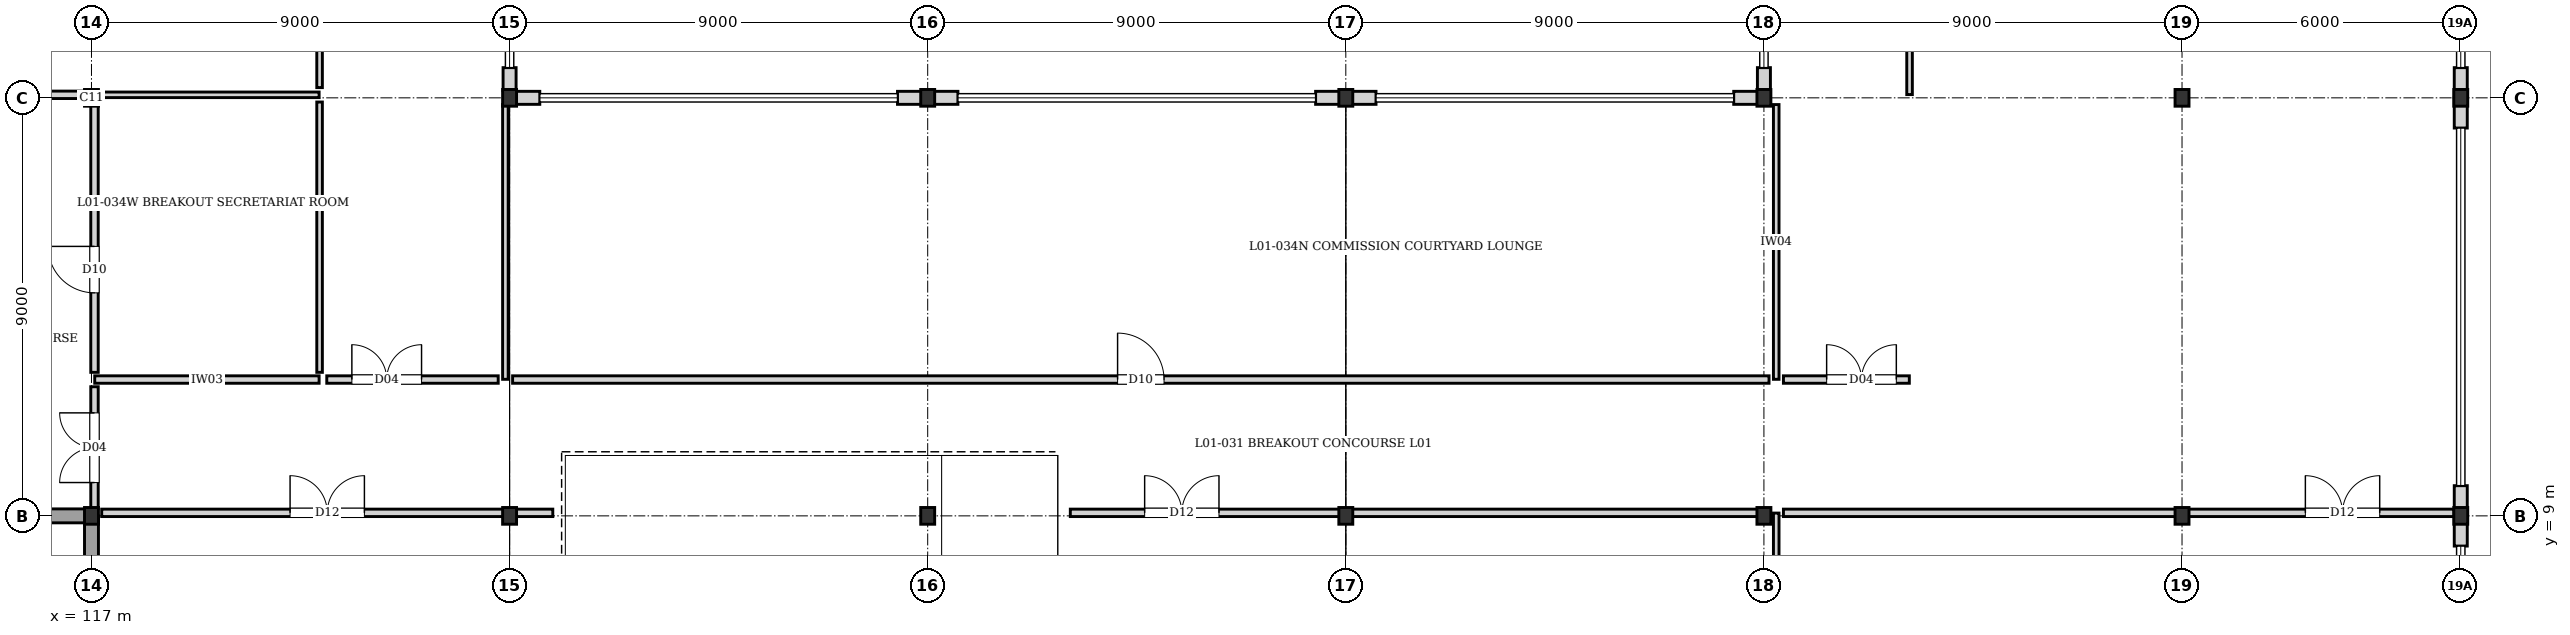
"""IFC4 building model, lengths in metres.
Left out: names, types, materials, properties, quantities, classifications, styles, units other than length and angle.
Written with IfcOpenShell. Run it as: python <this file> out.ifc"""

import sys

from ifc_helpers import new_model, si_unit, direction, frame, frame_2d, origin, origin_2d, place, context, subcontext, project, spatial, rectangle, i_section, extrude, element, fill, save


model = new_model("IFC4")
c1 = context("Model", 3, precision=1e-05, world=origin(), true_north=direction((0.0, 1.0)))
c2 = subcontext(c1, "Body", "Model", "MODEL_VIEW")
j1 = project(units=[si_unit("LENGTHUNIT", "METRE"), si_unit("PLANEANGLEUNIT", "RADIAN")], contexts=[c1])
p1 = place(None, origin())
s1 = spatial("IfcSite", under=j1, at=p1, CompositionType="ELEMENT")
p2 = place(p1, origin())
s2 = spatial("IfcBuilding", under=s1, at=p2, CompositionType="ELEMENT")
p3 = place(p2, frame((0.0, 0.0, 4.32)))
s3 = spatial("IfcBuildingStorey", under=s2, at=p3, CompositionType="ELEMENT", Elevation=4.32)
for number, where, z_axis, x_axis in (
    (1, (117.0, 9.0, 0.0), (0.0, 0.0, 1.0), (1.0, 0.0, 0.0)),
    (2, (117.0, 18.0, 0.0), (0.0, 0.0, 1.0), (1.0, 0.0, 0.0)),
    (3, (126.0, 9.0, 0.0), (0.0, 0.0, 1.0), (1.0, 0.0, 0.0)),
    (4, (126.0, 18.0, 0.0), (0.0, 0.0, 1.0), (1.0, 0.0, 0.0)),
    (5, (135.0, 9.0, 0.0), (0.0, 0.0, 1.0), (1.0, 0.0, 0.0)),
    (6, (135.0, 18.0, 0.0), (0.0, 0.0, 1.0), (1.0, 0.0, 0.0)),
    (7, (144.0, 9.0, 0.0), (0.0, 0.0, 1.0), (1.0, 0.0, 0.0)),
    (8, (144.0, 18.0, 0.0), (0.0, 0.0, 1.0), (1.0, 0.0, 0.0)),
    (9, (153.0, 9.0, 0.0), (0.0, 0.0, 1.0), (1.0, 0.0, 0.0)),
    (10, (153.0, 18.0, 0.0), (0.0, 0.0, 1.0), (1.0, 0.0, 0.0)),
    (11, (162.0, 9.0, 0.0), (0.0, 0.0, 1.0), (1.0, 0.0, 0.0)),
    (12, (162.0, 18.0, 0.0), (0.0, 0.0, 1.0), (1.0, 0.0, 0.0)),
    (13, (168.0, 9.0, 0.0), (0.0, 0.0, 1.0), (1.0, 0.0, 0.0)),
    (14, (168.0, 18.0, 0.0), (0.0, 0.0, 1.0), (1.0, 0.0, 0.0)),
):
    element("IfcColumn", number, at=place(p3, frame(where, z_axis=z_axis, x_axis=x_axis)), inside=s3, PredefinedType="COLUMN", context=c2, shape_type="SweptSolid", body=[
        extrude(i_section(OverallWidth=0.3, OverallDepth=0.36, WebThickness=0.012, FlangeThickness=0.022, at=origin_2d()), origin(), (0.0, 0.0, 1.0), 3.84),
    ])
p4 = place(p3, frame((168.0, 18.65, 0.0), z_axis=(0.0, 0.0, 1.0), x_axis=(0.0, -1.0, 0.0)))
e15 = element("IfcWall", 15, at=p4, inside=s3, PredefinedType="SOLIDWALL", context=c2, shape_type="SweptSolid", body=[
    extrude(rectangle(XDim=0.65, YDim=0.28, at=frame_2d((0.325, 0.0))), origin(), (0.0, 0.0, 1.0), 3.22),
])
for number, where, z_axis, x_axis in (
    (16, (168.0, 18.0, 0.0), (0.0, 0.0, 1.0), (0.0, -1.0, 0.0)),
    (17, (168.0, 9.65, 0.0), (0.0, 0.0, 1.0), (0.0, -1.0, 0.0)),
):
    element("IfcWall", number, at=place(p3, frame(where, z_axis=z_axis, x_axis=x_axis)), inside=s3, PredefinedType="SOLIDWALL", context=c2, shape_type="SweptSolid", body=[
        extrude(rectangle(XDim=0.65, YDim=0.28, at=frame_2d((0.325, 0.0))), origin(), (0.0, 0.0, 1.0), 3.28),
    ])
p5 = place(p3, frame((168.0, 9.0, 0.0), z_axis=(0.0, 0.0, 1.0), x_axis=(0.0, -1.0, 0.0)))
e18 = element("IfcWall", 18, at=p5, inside=s3, PredefinedType="SOLIDWALL", context=c2, shape_type="SweptSolid", body=[
    extrude(rectangle(XDim=0.65, YDim=0.28, at=frame_2d((0.325, 0.0))), origin(), (0.0, 0.0, 1.0), 3.6),
])
for number, where, z_axis, x_axis in (
    (19, (153.0, 18.155, 0.0), (0.0, 0.0, 1.0), (0.0, 1.0, 0.0)),
    (20, (126.0, 18.65, 0.0), (0.0, 0.0, 1.0), (0.0, -1.0, 0.0)),
):
    element("IfcWall", number, at=place(p3, frame(where, z_axis=z_axis, x_axis=x_axis)), inside=s3, PredefinedType="SOLIDWALL", context=c2, shape_type="SweptSolid", body=[
        extrude(rectangle(XDim=0.495, YDim=0.28, at=frame_2d((0.248, 0.0))), origin(), (0.0, 0.0, 1.0), 3.6),
    ])
for number, where, z_axis, x_axis in (
    (21, (126.0, 18.0, 0.0), (0.0, 0.0, 1.0), (1.0, 0.0, 0.0)),
    (22, (134.35, 18.0, 0.0), (0.0, 0.0, 1.0), (1.0, 0.0, 0.0)),
):
    element("IfcWall", number, at=place(p3, frame(where, z_axis=z_axis, x_axis=x_axis)), inside=s3, PredefinedType="SOLIDWALL", context=c2, shape_type="SweptSolid", body=[
        extrude(rectangle(XDim=0.65, YDim=0.28, at=frame_2d((0.325, 0.0))), origin(), (0.0, 0.0, 1.0), 3.28),
    ])
for number, where, z_axis, x_axis in (
    (23, (135.0, 18.0, 0.0), (0.0, 0.0, 1.0), (1.0, 0.0, 0.0)),
    (24, (143.35, 18.0, 0.0), (0.0, 0.0, 1.0), (1.0, 0.0, 0.0)),
):
    element("IfcWall", number, at=place(p3, frame(where, z_axis=z_axis, x_axis=x_axis)), inside=s3, PredefinedType="SOLIDWALL", context=c2, shape_type="SweptSolid", body=[
        extrude(rectangle(XDim=0.65, YDim=0.28, at=frame_2d((0.325, 0.0))), origin(), (0.0, 0.0, 1.0), 3.22),
    ])
for number, where, z_axis, x_axis in (
    (25, (144.0, 18.0, 0.0), (0.0, 0.0, 1.0), (1.0, 0.0, 0.0)),
    (26, (152.35, 18.0, 0.0), (0.0, 0.0, 1.0), (1.0, 0.0, 0.0)),
):
    element("IfcWall", number, at=place(p3, frame(where, z_axis=z_axis, x_axis=x_axis)), inside=s3, PredefinedType="SOLIDWALL", context=c2, shape_type="SweptSolid", body=[
        extrude(rectangle(XDim=0.65, YDim=0.28, at=frame_2d((0.325, 0.0))), origin(), (0.0, 0.0, 1.0), 3.18),
    ])
p6 = place(p3, frame((117.0, 0.0, 0.0), z_axis=(0.0, 0.0, 1.0), x_axis=(0.0, 1.0, 0.0)))
e27 = element("IfcWall", 27, at=p6, inside=s3, PredefinedType="SHEAR", context=c2, shape_type="SweptSolid", body=[
    extrude(rectangle(XDim=9.0, YDim=0.3, at=frame_2d((4.5, 0.0))), origin(), (0.0, 0.0, 1.0), 3.6),
])
p7 = place(p3, frame((108.0, 9.0, 0.0), z_axis=(0.0, 0.0, 1.0), x_axis=(1.0, 0.0, 0.0)))
e28 = element("IfcWall", 28, at=p7, inside=s3, PredefinedType="SHEAR", context=c2, shape_type="SweptSolid", body=[
    extrude(rectangle(XDim=9.0, YDim=0.3, at=frame_2d((4.5, 0.0))), origin(), (0.0, 0.0, 1.0), 3.6),
])
p8 = place(p7, frame((6.05, 0.0, 0.0)))
e29 = element("IfcOpeningElement", 29, at=p8, cuts=e28, PredefinedType="OPENING", context=c2, shape_type="SweptSolid", body=[
    extrude(rectangle(XDim=1.4, YDim=2.02, at=frame_2d((0.7, 1.01))), frame((0.0, 0.16, 0.0), z_axis=(0.0, -1.0, 0.0), x_axis=(1.0, 0.0, 0.0)), (0.0, 0.0, 1.0), 0.32),
])
p9 = place(p3, frame((108.145, 18.065, 0.0), z_axis=(0.0, 0.0, 1.0), x_axis=(1.0, 0.0, 0.0)))
e30 = element("IfcWall", 30, at=p9, inside=s3, PredefinedType="PARTITIONING", context=c2, shape_type="SweptSolid", body=[
    extrude(rectangle(XDim=8.915, YDim=0.16, at=frame_2d((4.458, 0.0))), origin(), (0.0, 0.0, 1.0), 3.18),
])
p10 = place(p3, frame((117.07, 11.935, 0.0), z_axis=(0.0, 0.0, 1.0), x_axis=(1.0, 0.0, 0.0)))
e31 = element("IfcWall", 31, at=p10, inside=s3, PredefinedType="PARTITIONING", context=c2, shape_type="SweptSolid", body=[
    extrude(rectangle(XDim=4.83, YDim=0.16, at=frame_2d((2.415, 0.0))), origin(), (0.0, 0.0, 1.0), 3.6),
])
p11 = place(p3, frame((153.265, 11.94, 0.0), z_axis=(0.0, 0.0, 1.0), x_axis=(0.0, 1.0, 0.0)))
e32 = element("IfcWall", 32, at=p11, inside=s3, PredefinedType="PARTITIONING", context=c2, shape_type="SweptSolid", body=[
    extrude(rectangle(XDim=5.915, YDim=0.12, at=frame_2d((2.958, 0.0))), origin(), (0.0, 0.0, 1.0), 3.6),
])
p12 = place(p3, frame((153.265, 0.145, 0.0), z_axis=(0.0, 0.0, 1.0), x_axis=(0.0, 1.0, 0.0)))
e33 = element("IfcWall", 33, at=p12, inside=s3, PredefinedType="PARTITIONING", context=c2, shape_type="SweptSolid", body=[
    extrude(rectangle(XDim=8.915, YDim=0.12, at=frame_2d((4.458, 0.0))), origin(), (0.0, 0.0, 1.0), 3.6),
])
p13 = place(p3, frame((117.07, 18.065, 0.0), z_axis=(0.0, 0.0, 1.0), x_axis=(1.0, 0.0, 0.0)))
e34 = element("IfcWall", 34, at=p13, inside=s3, PredefinedType="PARTITIONING", context=c2, shape_type="SweptSolid", body=[
    extrude(rectangle(XDim=4.83, YDim=0.12, at=frame_2d((2.415, 0.0))), origin(), (0.0, 0.0, 1.0), 3.35),
])
p14 = place(p3, frame((121.91, 12.09, 0.0), z_axis=(0.0, 0.0, 1.0), x_axis=(0.0, 1.0, 0.0)))
e35 = element("IfcWall", 35, at=p14, inside=s3, PredefinedType="PARTITIONING", context=c2, shape_type="SweptSolid", body=[
    extrude(rectangle(XDim=5.82, YDim=0.12, at=frame_2d((2.91, 0.0))), origin(), (0.0, 0.0, 1.0), 3.6),
])
p15 = place(p3, frame((125.91, 11.94, 0.0), z_axis=(0.0, 0.0, 1.0), x_axis=(0.0, 1.0, 0.0)))
e36 = element("IfcWall", 36, at=p15, inside=s3, PredefinedType="PARTITIONING", context=c2, shape_type="SweptSolid", body=[
    extrude(rectangle(XDim=5.915, YDim=0.12, at=frame_2d((2.958, 0.0))), origin(), (0.0, 0.0, 1.0), 3.09),
])
p16 = place(p3, frame((117.065, 9.155, 0.0), z_axis=(0.0, 0.0, 1.0), x_axis=(0.0, 1.0, 0.0)))
e37 = element("IfcWall", 37, at=p16, inside=s3, PredefinedType="PARTITIONING", context=c2, shape_type="SweptSolid", body=[
    extrude(rectangle(XDim=2.625, YDim=0.16, at=frame_2d((1.312, 0.0))), origin(), (0.0, 0.0, 1.0), 3.14),
])
p17 = place(p16, frame((0.562, 0.0, 0.0)))
e38 = element("IfcOpeningElement", 38, at=p17, cuts=e37, PredefinedType="OPENING", context=c2, shape_type="SweptSolid", body=[
    extrude(rectangle(XDim=1.5, YDim=2.1, at=frame_2d((0.75, 1.05))), frame((0.0, 0.09, 0.0), z_axis=(0.0, -1.0, 0.0), x_axis=(1.0, 0.0, 0.0)), (0.0, 0.0, 1.0), 0.18),
])
p18 = place(p3, frame((117.065, 12.09, 0.0), z_axis=(0.0, 0.0, 1.0), x_axis=(0.0, 1.0, 0.0)))
e39 = element("IfcWall", 39, at=p18, inside=s3, PredefinedType="PARTITIONING", context=c2, shape_type="SweptSolid", body=[
    extrude(rectangle(XDim=5.82, YDim=0.16, at=frame_2d((2.91, 0.0))), origin(), (0.0, 0.0, 1.0), 3.14),
])
p19 = place(p18, frame((1.712, 0.0, 0.0)))
e40 = element("IfcOpeningElement", 40, at=p19, cuts=e39, PredefinedType="OPENING", context=c2, shape_type="SweptSolid", body=[
    extrude(rectangle(XDim=1.0, YDim=2.1, at=frame_2d((0.5, 1.05))), frame((0.0, 0.09, 0.0), z_axis=(0.0, -1.0, 0.0), x_axis=(1.0, 0.0, 0.0)), (0.0, 0.0, 1.0), 0.18),
])
p20 = place(p3, frame((153.42, 11.935, 0.0), z_axis=(0.0, 0.0, 1.0), x_axis=(1.0, 0.0, 0.0)))
e41 = element("IfcWall", 41, at=p20, inside=s3, PredefinedType="PARTITIONING", context=c2, shape_type="SweptSolid", body=[
    extrude(rectangle(XDim=2.71, YDim=0.16, at=frame_2d((1.355, 0.0))), origin(), (0.0, 0.0, 1.0), 3.6),
])
p21 = place(p20, frame((0.93, 0.0, 0.0)))
e42 = element("IfcOpeningElement", 42, at=p21, cuts=e41, PredefinedType="OPENING", context=c2, shape_type="SweptSolid", body=[
    extrude(rectangle(XDim=1.5, YDim=2.1, at=frame_2d((0.75, 1.05))), frame((0.0, 0.09, 0.0), z_axis=(0.0, -1.0, 0.0), x_axis=(1.0, 0.0, 0.0)), (0.0, 0.0, 1.0), 0.18),
])
p22 = place(p3, frame((117.22, 9.065, 0.0), z_axis=(0.0, 0.0, 1.0), x_axis=(1.0, 0.0, 0.0)))
e43 = element("IfcWall", 43, at=p22, inside=s3, PredefinedType="PARTITIONING", context=c2, shape_type="SweptSolid", body=[
    extrude(rectangle(XDim=8.76, YDim=0.16, at=frame_2d((4.38, 0.0))), origin(), (0.0, 0.0, 1.0), 2.98),
])
p23 = place(p22, frame((4.055, 0.0, 0.0)))
e44 = element("IfcOpeningElement", 44, at=p23, cuts=e43, PredefinedType="OPENING", context=c2, shape_type="SweptSolid", body=[
    extrude(rectangle(XDim=1.6, YDim=2.3, at=frame_2d((0.8, 1.15))), frame((0.0, 0.09, 0.0), z_axis=(0.0, -1.0, 0.0), x_axis=(1.0, 0.0, 0.0)), (0.0, 0.0, 1.0), 0.18),
])
p24 = place(p3, frame((138.07, 9.065, 0.0), z_axis=(0.0, 0.0, 1.0), x_axis=(1.0, 0.0, 0.0)))
e45 = element("IfcWall", 45, at=p24, inside=s3, PredefinedType="PARTITIONING", context=c2, shape_type="SweptSolid", body=[
    extrude(rectangle(XDim=5.95, YDim=0.16, at=frame_2d((2.975, 0.0))), origin(), (0.0, 0.0, 1.0), 3.6),
])
p25 = place(p24, frame((1.6, 0.0, 0.0)))
e46 = element("IfcOpeningElement", 46, at=p25, cuts=e45, PredefinedType="OPENING", context=c2, shape_type="SweptSolid", body=[
    extrude(rectangle(XDim=1.6, YDim=2.3, at=frame_2d((0.8, 1.15))), frame((0.0, 0.09, 0.0), z_axis=(0.0, -1.0, 0.0), x_axis=(1.0, 0.0, 0.0)), (0.0, 0.0, 1.0), 0.18),
])
p26 = place(p3, frame((153.42, 9.065, 0.0), z_axis=(0.0, 0.0, 1.0), x_axis=(1.0, 0.0, 0.0)))
e47 = element("IfcWall", 47, at=p26, inside=s3, PredefinedType="PARTITIONING", context=c2, shape_type="SweptSolid", body=[
    extrude(rectangle(XDim=8.56, YDim=0.16, at=frame_2d((4.28, 0.0))), origin(), (0.0, 0.0, 1.0), 3.19),
])
p27 = place(p3, frame((126.065, 11.935, 0.0), z_axis=(0.0, 0.0, 1.0), x_axis=(1.0, 0.0, 0.0)))
e48 = element("IfcWall", 48, at=p27, inside=s3, PredefinedType="PARTITIONING", context=c2, shape_type="SweptSolid", body=[
    extrude(rectangle(XDim=27.045, YDim=0.16, at=frame_2d((13.522, 0.0))), origin(), (0.0, 0.0, 1.0), 3.6),
])
p28 = place(p27, frame((13.022, 0.0, 0.0)))
e49 = element("IfcOpeningElement", 49, at=p28, cuts=e48, PredefinedType="OPENING", context=c2, shape_type="SweptSolid", body=[
    extrude(rectangle(XDim=1.0, YDim=2.1, at=frame_2d((0.5, 1.05))), frame((0.0, 0.09, 0.0), z_axis=(0.0, -1.0, 0.0), x_axis=(1.0, 0.0, 0.0)), (0.0, 0.0, 1.0), 0.18),
])
p29 = place(p3, frame((122.065, 11.935, 0.0), z_axis=(0.0, 0.0, 1.0), x_axis=(1.0, 0.0, 0.0)))
e50 = element("IfcWall", 50, at=p29, inside=s3, PredefinedType="PARTITIONING", context=c2, shape_type="SweptSolid", body=[
    extrude(rectangle(XDim=3.69, YDim=0.16, at=frame_2d((1.845, 0.0))), origin(), (0.0, 0.0, 1.0), 3.6),
])
p30 = place(p29, frame((0.54, 0.0, 0.0)))
e51 = element("IfcOpeningElement", 51, at=p30, cuts=e50, PredefinedType="OPENING", context=c2, shape_type="SweptSolid", body=[
    extrude(rectangle(XDim=1.5, YDim=2.1, at=frame_2d((0.75, 1.05))), frame((0.0, 0.09, 0.0), z_axis=(0.0, -1.0, 0.0), x_axis=(1.0, 0.0, 0.0)), (0.0, 0.0, 1.0), 0.18),
])
p31 = place(p3, frame((156.135, 18.07, 0.0), z_axis=(0.0, 0.0, 1.0), x_axis=(0.0, 1.0, 0.0)))
e52 = element("IfcWall", 52, at=p31, inside=s3, PredefinedType="PARTITIONING", context=c2, shape_type="SweptSolid", body=[
    extrude(rectangle(XDim=17.685, YDim=0.12, at=frame_2d((8.842, 0.0))), origin(), (0.0, 0.0, 1.0), 3.6),
])
p32 = place(p31, frame((14.485, 0.0, 0.0)))
e53 = element("IfcOpeningElement", 53, at=p32, cuts=e52, PredefinedType="OPENING", context=c2, shape_type="SweptSolid", body=[
    extrude(rectangle(XDim=1.6, YDim=2.3, at=frame_2d((0.8, 1.15))), frame((0.0, 0.07, 0.0), z_axis=(0.0, -1.0, 0.0), x_axis=(1.0, 0.0, 0.0)), (0.0, 0.0, 1.0), 0.14),
])
p33 = place(p3, frame((121.91, 18.22, 0.0), z_axis=(0.0, 0.0, 1.0), x_axis=(0.0, 1.0, 0.0)))
e54 = element("IfcWall", 54, at=p33, inside=s3, PredefinedType="PARTITIONING", context=c2, shape_type="SweptSolid", body=[
    extrude(rectangle(XDim=8.535, YDim=0.12, at=frame_2d((4.268, 0.0))), origin(), (0.0, 0.0, 1.0), 3.6),
])
p34 = place(p33, frame((3.468, 0.0, 0.0)))
e55 = element("IfcOpeningElement", 55, at=p34, cuts=e54, PredefinedType="OPENING", context=c2, shape_type="SweptSolid", body=[
    extrude(rectangle(XDim=1.6, YDim=2.3, at=frame_2d((0.8, 1.15))), frame((0.0, 0.07, 0.0), z_axis=(0.0, -1.0, 0.0), x_axis=(1.0, 0.0, 0.0)), (0.0, 0.0, 1.0), 0.14),
])
p35 = place(p3, frame((125.98, 9.065, 0.0), z_axis=(0.0, 0.0, 1.0), x_axis=(1.0, 0.0, 0.0)))
e56 = element("IfcWall", 56, at=p35, inside=s3, PredefinedType="PARTITIONING", context=c2, shape_type="SweptSolid", body=[
    extrude(rectangle(XDim=0.95, YDim=0.16, at=frame_2d((0.475, 0.0))), origin(), (0.0, 0.0, 1.0), 3.6),
])
p36 = place(p3, frame((144.02, 9.065, 0.0), z_axis=(0.0, 0.0, 1.0), x_axis=(1.0, 0.0, 0.0)))
e57 = element("IfcWall", 57, at=p36, inside=s3, PredefinedType="PARTITIONING", context=c2, shape_type="SweptSolid", body=[
    extrude(rectangle(XDim=9.09, YDim=0.16, at=frame_2d((4.545, 0.0))), origin(), (0.0, 0.0, 1.0), 3.25),
])
p37 = place(p3, frame((161.98, 9.065, 0.0), z_axis=(0.0, 0.0, 1.0), x_axis=(1.0, 0.0, 0.0)))
e58 = element("IfcWall", 58, at=p37, inside=s3, PredefinedType="PARTITIONING", context=c2, shape_type="SweptSolid", body=[
    extrude(rectangle(XDim=5.875, YDim=0.16, at=frame_2d((2.938, 0.0))), origin(), (0.0, 0.0, 1.0), 3.14),
])
p38 = place(p37, frame((2.675, 0.0, 0.0)))
e59 = element("IfcOpeningElement", 59, at=p38, cuts=e58, PredefinedType="OPENING", context=c2, shape_type="SweptSolid", body=[
    extrude(rectangle(XDim=1.6, YDim=2.3, at=frame_2d((0.8, 1.15))), frame((0.0, 0.09, 0.0), z_axis=(0.0, -1.0, 0.0), x_axis=(1.0, 0.0, 0.0)), (0.0, 0.0, 1.0), 0.18),
])
p39 = place(p17, origin())
e60 = element("IfcDoor", 60, at=p39, inside=s3, OperationType="DOUBLE_DOOR_SINGLE_SWING", PredefinedType="DOOR", context=c2, shape_type="SweptSolid", body=[
    extrude(rectangle(XDim=1.5, YDim=2.1, at=frame_2d((0.75, 1.05))), frame((0.0, 0.025, 0.0), z_axis=(0.0, -1.0, 0.0), x_axis=(1.0, 0.0, 0.0)), (0.0, 0.0, 1.0), 0.05),
])
fill(e38, e60)
p40 = place(p19, origin())
e61 = element("IfcDoor", 61, at=p40, inside=s3, OperationType="SINGLE_SWING_RIGHT", PredefinedType="DOOR", context=c2, shape_type="SweptSolid", body=[
    extrude(rectangle(XDim=1.0, YDim=2.1, at=frame_2d((0.5, 1.05))), frame((0.0, 0.025, 0.0), z_axis=(0.0, -1.0, 0.0), x_axis=(1.0, 0.0, 0.0)), (0.0, 0.0, 1.0), 0.05),
])
fill(e40, e61)
p41 = place(p21, origin())
e62 = element("IfcDoor", 62, at=p41, inside=s3, OperationType="DOUBLE_DOOR_SINGLE_SWING", PredefinedType="DOOR", context=c2, shape_type="SweptSolid", body=[
    extrude(rectangle(XDim=1.5, YDim=2.1, at=frame_2d((0.75, 1.05))), frame((0.0, 0.025, 0.0), z_axis=(0.0, -1.0, 0.0), x_axis=(1.0, 0.0, 0.0)), (0.0, 0.0, 1.0), 0.05),
])
fill(e42, e62)
p42 = place(p23, origin())
e63 = element("IfcDoor", 63, at=p42, inside=s3, OperationType="DOUBLE_DOOR_SINGLE_SWING", PredefinedType="DOOR", context=c2, shape_type="SweptSolid", body=[
    extrude(rectangle(XDim=1.6, YDim=2.3, at=frame_2d((0.8, 1.15))), frame((0.0, 0.025, 0.0), z_axis=(0.0, -1.0, 0.0), x_axis=(1.0, 0.0, 0.0)), (0.0, 0.0, 1.0), 0.05),
])
fill(e44, e63)
p43 = place(p25, origin())
e64 = element("IfcDoor", 64, at=p43, inside=s3, OperationType="DOUBLE_DOOR_SINGLE_SWING", PredefinedType="DOOR", context=c2, shape_type="SweptSolid", body=[
    extrude(rectangle(XDim=1.6, YDim=2.3, at=frame_2d((0.8, 1.15))), frame((0.0, 0.025, 0.0), z_axis=(0.0, -1.0, 0.0), x_axis=(1.0, 0.0, 0.0)), (0.0, 0.0, 1.0), 0.05),
])
fill(e46, e64)
p44 = place(p38, origin())
e65 = element("IfcDoor", 65, at=p44, inside=s3, OperationType="DOUBLE_DOOR_SINGLE_SWING", PredefinedType="DOOR", context=c2, shape_type="SweptSolid", body=[
    extrude(rectangle(XDim=1.6, YDim=2.3, at=frame_2d((0.8, 1.15))), frame((0.0, 0.025, 0.0), z_axis=(0.0, -1.0, 0.0), x_axis=(1.0, 0.0, 0.0)), (0.0, 0.0, 1.0), 0.05),
])
fill(e59, e65)
p45 = place(p28, origin())
e66 = element("IfcDoor", 66, at=p45, inside=s3, OperationType="SINGLE_SWING_LEFT", PredefinedType="DOOR", context=c2, shape_type="SweptSolid", body=[
    extrude(rectangle(XDim=1.0, YDim=2.1, at=frame_2d((0.5, 1.05))), frame((0.0, 0.025, 0.0), z_axis=(0.0, -1.0, 0.0), x_axis=(1.0, 0.0, 0.0)), (0.0, 0.0, 1.0), 0.05),
])
fill(e49, e66)
p46 = place(p30, origin())
e67 = element("IfcDoor", 67, at=p46, inside=s3, OperationType="DOUBLE_DOOR_SINGLE_SWING", PredefinedType="DOOR", context=c2, shape_type="SweptSolid", body=[
    extrude(rectangle(XDim=1.5, YDim=2.1, at=frame_2d((0.75, 1.05))), frame((0.0, 0.025, 0.0), z_axis=(0.0, -1.0, 0.0), x_axis=(1.0, 0.0, 0.0)), (0.0, 0.0, 1.0), 0.05),
])
fill(e51, e67)
save(model, sys.argv[1])
